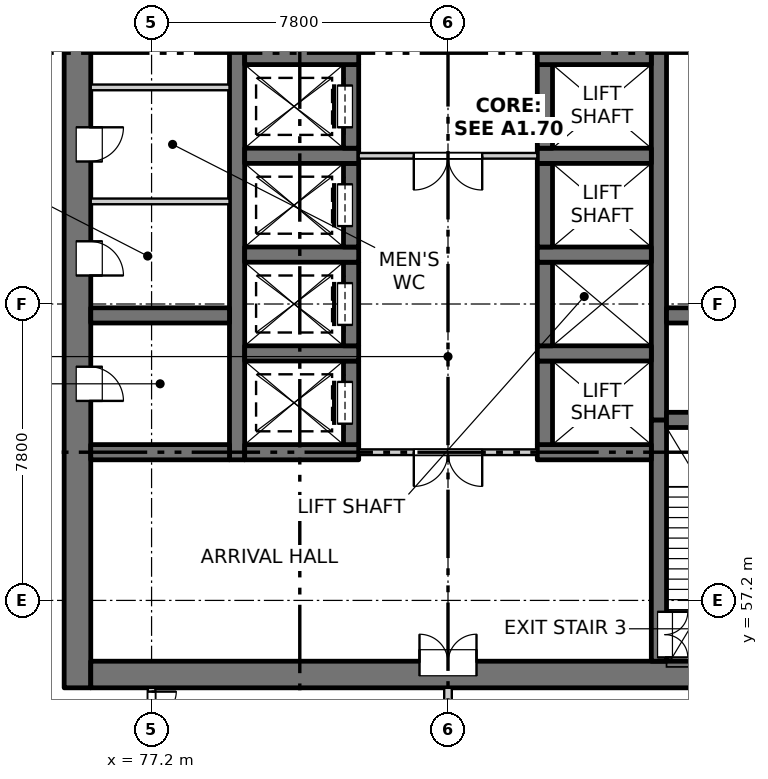
"""IFC4 building model, lengths in metres.
Left out: names, types, materials, properties, quantities, classifications, styles, units other than length and angle.
Written with IfcOpenShell. Run it as: python <this file> out.ifc"""

import sys

from ifc_helpers import new_model, si_unit, direction, frame, frame_2d, origin, place, context, subcontext, project, spatial, rectangle, extrude, element, fill, save


model = new_model("IFC4")
c1 = context("Model", 3, precision=1e-05, world=origin(), true_north=direction((0.0, 1.0)))
c2 = subcontext(c1, "Body", "Model", "MODEL_VIEW")
j1 = project(units=[si_unit("LENGTHUNIT", "METRE"), si_unit("PLANEANGLEUNIT", "RADIAN")], contexts=[c1])
p1 = place(None, origin())
s1 = spatial("IfcSite", under=j1, at=p1, CompositionType="ELEMENT")
p2 = place(p1, origin())
s2 = spatial("IfcBuilding", under=s1, at=p2, CompositionType="ELEMENT")
p3 = place(p2, frame((0.0, 0.0, 6.0)))
s3 = spatial("IfcBuildingStorey", under=s2, at=p3, CompositionType="ELEMENT", Elevation=6.0)
p4 = place(p3, frame((75.25, 54.9, -0.3), z_axis=(0.0, 0.0, 1.0), x_axis=(0.0, 1.0, 0.0)))
e1 = element("IfcWall", 1, at=p4, inside=s3, PredefinedType="SOLIDWALL", context=c2, shape_type="SweptSolid", body=[
    extrude(rectangle(XDim=22.4, YDim=0.7, at=frame_2d((11.2, 0.0))), origin(), (0.0, 0.0, 1.0), 4.5),
])
p5 = place(p4, frame((7.55, 0.0, 0.3)))
e2 = element("IfcOpeningElement", 2, at=p5, cuts=e1, PredefinedType="OPENING", context=c2, shape_type="SweptSolid", body=[
    extrude(rectangle(XDim=0.9, YDim=2.1, at=frame_2d((0.45, 1.05))), frame((0.0, 0.36, 0.0), z_axis=(0.0, -1.0, 0.0), x_axis=(1.0, 0.0, 0.0)), (0.0, 0.0, 1.0), 0.72),
])
p6 = place(p4, frame((10.85, 0.0, 0.3)))
e3 = element("IfcOpeningElement", 3, at=p6, cuts=e1, PredefinedType="OPENING", context=c2, shape_type="SweptSolid", body=[
    extrude(rectangle(XDim=0.9, YDim=2.1, at=frame_2d((0.45, 1.05))), frame((0.0, 0.36, 0.0), z_axis=(0.0, -1.0, 0.0), x_axis=(1.0, 0.0, 0.0)), (0.0, 0.0, 1.0), 0.72),
])
p7 = place(p4, frame((13.85, 0.0, 0.3)))
e4 = element("IfcOpeningElement", 4, at=p7, cuts=e1, PredefinedType="OPENING", context=c2, shape_type="SweptSolid", body=[
    extrude(rectangle(XDim=0.9, YDim=2.1, at=frame_2d((0.45, 1.05))), frame((0.0, 0.36, 0.0), z_axis=(0.0, -1.0, 0.0), x_axis=(1.0, 0.0, 0.0)), (0.0, 0.0, 1.0), 0.72),
])
p8 = place(p4, frame((16.85, 0.0, 0.3)))
e5 = element("IfcOpeningElement", 5, at=p8, cuts=e1, PredefinedType="OPENING", context=c2, shape_type="SweptSolid", body=[
    extrude(rectangle(XDim=0.9, YDim=2.1, at=frame_2d((0.45, 1.05))), frame((0.0, 0.36, 0.0), z_axis=(0.0, -1.0, 0.0), x_axis=(1.0, 0.0, 0.0)), (0.0, 0.0, 1.0), 0.72),
])
p9 = place(p4, frame((20.15, 0.0, 0.3)))
e6 = element("IfcOpeningElement", 6, at=p9, cuts=e1, PredefinedType="OPENING", context=c2, shape_type="SweptSolid", body=[
    extrude(rectangle(XDim=0.9, YDim=2.1, at=frame_2d((0.45, 1.05))), frame((0.0, 0.36, 0.0), z_axis=(0.0, -1.0, 0.0), x_axis=(1.0, 0.0, 0.0)), (0.0, 0.0, 1.0), 0.72),
])
p10 = place(p3, frame((75.6, 55.25, -0.3), z_axis=(0.0, 0.0, 1.0), x_axis=(1.0, 0.0, 0.0)))
e7 = element("IfcWall", 7, at=p10, inside=s3, PredefinedType="SOLIDWALL", context=c2, shape_type="SweptSolid", body=[
    extrude(rectangle(XDim=18.8, YDim=0.7, at=frame_2d((9.4, 0.0))), origin(), (0.0, 0.0, 1.0), 4.5),
])
p11 = place(p10, frame((8.65, 0.0, 0.3)))
e8 = element("IfcOpeningElement", 8, at=p11, cuts=e7, PredefinedType="OPENING", context=c2, shape_type="SweptSolid", body=[
    extrude(rectangle(XDim=1.5, YDim=2.1, at=frame_2d((0.75, 1.05))), frame((0.0, 0.36, 0.0), z_axis=(0.0, -1.0, 0.0), x_axis=(1.0, 0.0, 0.0)), (0.0, 0.0, 1.0), 0.72),
])
p12 = place(p3, frame((79.45, 60.9, -0.3), z_axis=(0.0, 0.0, 1.0), x_axis=(0.0, 1.0, 0.0)))
e9 = element("IfcWall", 9, at=p12, inside=s3, PredefinedType="SOLIDWALL", context=c2, shape_type="SweptSolid", body=[
    extrude(rectangle(XDim=16.4, YDim=0.4, at=frame_2d((8.2, 0.0))), origin(), (0.0, 0.0, 1.0), 4.5),
])
p13 = place(p3, frame((90.55, 55.6, -0.3), z_axis=(0.0, 0.0, 1.0), x_axis=(0.0, 1.0, 0.0)))
e10 = element("IfcWall", 10, at=p13, inside=s3, PredefinedType="SOLIDWALL", context=c2, shape_type="SweptSolid", body=[
    extrude(rectangle(XDim=6.35, YDim=0.4, at=frame_2d((3.175, 0.0))), origin(), (0.0, 0.0, 1.0), 4.5),
])
p14 = place(p13, frame((0.1, 0.0, 0.3)))
e11 = element("IfcOpeningElement", 11, at=p14, cuts=e10, PredefinedType="OPENING", context=c2, shape_type="SweptSolid", body=[
    extrude(rectangle(XDim=1.2, YDim=2.1, at=frame_2d((0.6, 1.05))), frame((0.0, 0.21, 0.0), z_axis=(0.0, -1.0, 0.0), x_axis=(1.0, 0.0, 0.0)), (0.0, 0.0, 1.0), 0.42),
])
p15 = place(p3, frame((90.55, 61.95, -0.3), z_axis=(0.0, 0.0, 1.0), x_axis=(0.0, 1.0, 0.0)))
e12 = element("IfcWall", 12, at=p15, inside=s3, PredefinedType="SOLIDWALL", context=c2, shape_type="SweptSolid", body=[
    extrude(rectangle(XDim=15.35, YDim=0.4, at=frame_2d((7.675, 0.0))), origin(), (0.0, 0.0, 1.0), 4.5),
])
p16 = place(p3, frame((79.65, 61.1, -0.3), z_axis=(0.0, 0.0, 1.0), x_axis=(1.0, 0.0, 0.0)))
e13 = element("IfcWall", 13, at=p16, inside=s3, PredefinedType="SOLIDWALL", context=c2, shape_type="SweptSolid", body=[
    extrude(rectangle(XDim=3.0, YDim=0.4, at=frame_2d((1.5, 0.0))), origin(), (0.0, 0.0, 1.0), 4.5),
])
p17 = place(p3, frame((82.45, 61.3, -0.3), z_axis=(0.0, 0.0, 1.0), x_axis=(0.0, 1.0, 0.0)))
e14 = element("IfcWall", 14, at=p17, inside=s3, PredefinedType="SOLIDWALL", context=c2, shape_type="SweptSolid", body=[
    extrude(rectangle(XDim=2.2, YDim=0.4, at=frame_2d((1.1, 0.0))), origin(), (0.0, 0.0, 1.0), 4.5),
])
p18 = place(p17, frame((0.55, 0.0, 0.3)))
e15 = element("IfcOpeningElement", 15, at=p18, cuts=e14, PredefinedType="OPENING", context=c2, shape_type="SweptSolid", body=[
    extrude(rectangle(XDim=1.1, YDim=2.1, at=frame_2d((0.55, 1.05))), frame((0.0, 0.21, 0.0), z_axis=(0.0, -1.0, 0.0), x_axis=(1.0, 0.0, 0.0)), (0.0, 0.0, 1.0), 0.42),
])
p19 = place(p3, frame((79.65, 63.7, -0.3), z_axis=(0.0, 0.0, 1.0), x_axis=(1.0, 0.0, 0.0)))
e16 = element("IfcWall", 16, at=p19, inside=s3, PredefinedType="SOLIDWALL", context=c2, shape_type="SweptSolid", body=[
    extrude(rectangle(XDim=3.0, YDim=0.4, at=frame_2d((1.5, 0.0))), origin(), (0.0, 0.0, 1.0), 4.5),
])
p20 = place(p3, frame((82.45, 63.9, -0.3), z_axis=(0.0, 0.0, 1.0), x_axis=(0.0, 1.0, 0.0)))
e17 = element("IfcWall", 17, at=p20, inside=s3, PredefinedType="SOLIDWALL", context=c2, shape_type="SweptSolid", body=[
    extrude(rectangle(XDim=2.2, YDim=0.4, at=frame_2d((1.1, 0.0))), origin(), (0.0, 0.0, 1.0), 4.5),
])
p21 = place(p20, frame((0.55, 0.0, 0.3)))
e18 = element("IfcOpeningElement", 18, at=p21, cuts=e17, PredefinedType="OPENING", context=c2, shape_type="SweptSolid", body=[
    extrude(rectangle(XDim=1.1, YDim=2.1, at=frame_2d((0.55, 1.05))), frame((0.0, 0.21, 0.0), z_axis=(0.0, -1.0, 0.0), x_axis=(1.0, 0.0, 0.0)), (0.0, 0.0, 1.0), 0.42),
])
p22 = place(p3, frame((79.65, 66.3, -0.3), z_axis=(0.0, 0.0, 1.0), x_axis=(1.0, 0.0, 0.0)))
e19 = element("IfcWall", 19, at=p22, inside=s3, PredefinedType="SOLIDWALL", context=c2, shape_type="SweptSolid", body=[
    extrude(rectangle(XDim=3.0, YDim=0.4, at=frame_2d((1.5, 0.0))), origin(), (0.0, 0.0, 1.0), 4.5),
])
p23 = place(p3, frame((82.45, 66.5, -0.3), z_axis=(0.0, 0.0, 1.0), x_axis=(0.0, 1.0, 0.0)))
e20 = element("IfcWall", 20, at=p23, inside=s3, PredefinedType="SOLIDWALL", context=c2, shape_type="SweptSolid", body=[
    extrude(rectangle(XDim=2.2, YDim=0.4, at=frame_2d((1.1, 0.0))), origin(), (0.0, 0.0, 1.0), 4.5),
])
p24 = place(p23, frame((0.55, 0.0, 0.3)))
e21 = element("IfcOpeningElement", 21, at=p24, cuts=e20, PredefinedType="OPENING", context=c2, shape_type="SweptSolid", body=[
    extrude(rectangle(XDim=1.1, YDim=2.1, at=frame_2d((0.55, 1.05))), frame((0.0, 0.21, 0.0), z_axis=(0.0, -1.0, 0.0), x_axis=(1.0, 0.0, 0.0)), (0.0, 0.0, 1.0), 0.42),
])
p25 = place(p3, frame((79.65, 68.9, -0.3), z_axis=(0.0, 0.0, 1.0), x_axis=(1.0, 0.0, 0.0)))
e22 = element("IfcWall", 22, at=p25, inside=s3, PredefinedType="SOLIDWALL", context=c2, shape_type="SweptSolid", body=[
    extrude(rectangle(XDim=3.0, YDim=0.4, at=frame_2d((1.5, 0.0))), origin(), (0.0, 0.0, 1.0), 4.5),
])
p26 = place(p3, frame((82.45, 69.1, -0.3), z_axis=(0.0, 0.0, 1.0), x_axis=(0.0, 1.0, 0.0)))
e23 = element("IfcWall", 23, at=p26, inside=s3, PredefinedType="SOLIDWALL", context=c2, shape_type="SweptSolid", body=[
    extrude(rectangle(XDim=2.2, YDim=0.4, at=frame_2d((1.1, 0.0))), origin(), (0.0, 0.0, 1.0), 4.5),
])
p27 = place(p26, frame((0.55, 0.0, 0.3)))
e24 = element("IfcOpeningElement", 24, at=p27, cuts=e23, PredefinedType="OPENING", context=c2, shape_type="SweptSolid", body=[
    extrude(rectangle(XDim=1.1, YDim=2.1, at=frame_2d((0.55, 1.05))), frame((0.0, 0.21, 0.0), z_axis=(0.0, -1.0, 0.0), x_axis=(1.0, 0.0, 0.0)), (0.0, 0.0, 1.0), 0.42),
])
for number, where, z_axis, x_axis in (
    (25, (79.65, 71.5, -0.3), (0.0, 0.0, 1.0), (1.0, 0.0, 0.0)),
    (26, (87.35, 61.1, -0.3), (0.0, 0.0, 1.0), (1.0, 0.0, 0.0)),
):
    element("IfcWall", number, at=place(p3, frame(where, z_axis=z_axis, x_axis=x_axis)), inside=s3, PredefinedType="SOLIDWALL", context=c2, shape_type="SweptSolid", body=[
        extrude(rectangle(XDim=3.0, YDim=0.4, at=frame_2d((1.5, 0.0))), origin(), (0.0, 0.0, 1.0), 4.5),
    ])
p28 = place(p3, frame((87.55, 61.3, -0.3), z_axis=(0.0, 0.0, 1.0), x_axis=(0.0, 1.0, 0.0)))
e27 = element("IfcWall", 27, at=p28, inside=s3, PredefinedType="SOLIDWALL", context=c2, shape_type="SweptSolid", body=[
    extrude(rectangle(XDim=2.2, YDim=0.4, at=frame_2d((1.1, 0.0))), origin(), (0.0, 0.0, 1.0), 4.5),
])
p29 = place(p3, frame((87.35, 63.7, -0.3), z_axis=(0.0, 0.0, 1.0), x_axis=(1.0, 0.0, 0.0)))
e28 = element("IfcWall", 28, at=p29, inside=s3, PredefinedType="SOLIDWALL", context=c2, shape_type="SweptSolid", body=[
    extrude(rectangle(XDim=3.0, YDim=0.4, at=frame_2d((1.5, 0.0))), origin(), (0.0, 0.0, 1.0), 4.5),
])
p30 = place(p3, frame((87.55, 63.9, -0.3), z_axis=(0.0, 0.0, 1.0), x_axis=(0.0, 1.0, 0.0)))
e29 = element("IfcWall", 29, at=p30, inside=s3, PredefinedType="SOLIDWALL", context=c2, shape_type="SweptSolid", body=[
    extrude(rectangle(XDim=2.2, YDim=0.4, at=frame_2d((1.1, 0.0))), origin(), (0.0, 0.0, 1.0), 4.5),
])
p31 = place(p3, frame((87.35, 66.3, -0.3), z_axis=(0.0, 0.0, 1.0), x_axis=(1.0, 0.0, 0.0)))
e30 = element("IfcWall", 30, at=p31, inside=s3, PredefinedType="SOLIDWALL", context=c2, shape_type="SweptSolid", body=[
    extrude(rectangle(XDim=3.0, YDim=0.4, at=frame_2d((1.5, 0.0))), origin(), (0.0, 0.0, 1.0), 4.5),
])
p32 = place(p3, frame((87.55, 66.5, -0.3), z_axis=(0.0, 0.0, 1.0), x_axis=(0.0, 1.0, 0.0)))
e31 = element("IfcWall", 31, at=p32, inside=s3, PredefinedType="SOLIDWALL", context=c2, shape_type="SweptSolid", body=[
    extrude(rectangle(XDim=2.2, YDim=0.4, at=frame_2d((1.1, 0.0))), origin(), (0.0, 0.0, 1.0), 4.5),
])
p33 = place(p3, frame((87.35, 68.9, -0.3), z_axis=(0.0, 0.0, 1.0), x_axis=(1.0, 0.0, 0.0)))
e32 = element("IfcWall", 32, at=p33, inside=s3, PredefinedType="SOLIDWALL", context=c2, shape_type="SweptSolid", body=[
    extrude(rectangle(XDim=3.0, YDim=0.4, at=frame_2d((1.5, 0.0))), origin(), (0.0, 0.0, 1.0), 4.5),
])
p34 = place(p3, frame((87.55, 69.1, -0.3), z_axis=(0.0, 0.0, 1.0), x_axis=(0.0, 1.0, 0.0)))
e33 = element("IfcWall", 33, at=p34, inside=s3, PredefinedType="SOLIDWALL", context=c2, shape_type="SweptSolid", body=[
    extrude(rectangle(XDim=2.2, YDim=0.4, at=frame_2d((1.1, 0.0))), origin(), (0.0, 0.0, 1.0), 4.5),
])
p35 = place(p3, frame((87.35, 71.5, -0.3), z_axis=(0.0, 0.0, 1.0), x_axis=(1.0, 0.0, 0.0)))
e34 = element("IfcWall", 34, at=p35, inside=s3, PredefinedType="SOLIDWALL", context=c2, shape_type="SweptSolid", body=[
    extrude(rectangle(XDim=3.0, YDim=0.4, at=frame_2d((1.5, 0.0))), origin(), (0.0, 0.0, 1.0), 4.5),
])
for number, where, z_axis, x_axis in (
    (35, (75.6, 61.1, -0.3), (0.0, 0.0, 1.0), (1.0, 0.0, 0.0)),
    (36, (75.6, 64.7, -0.3), (0.0, 0.0, 1.0), (1.0, 0.0, 0.0)),
    (37, (90.75, 61.95, -0.3), (0.0, 0.0, 1.0), (1.0, 0.0, 0.0)),
    (38, (90.75, 64.7, -0.3), (0.0, 0.0, 1.0), (1.0, 0.0, 0.0)),
):
    element("IfcWall", number, at=place(p3, frame(where, z_axis=z_axis, x_axis=x_axis)), inside=s3, PredefinedType="SOLIDWALL", context=c2, shape_type="SweptSolid", body=[
        extrude(rectangle(XDim=3.65, YDim=0.4, at=frame_2d((1.825, 0.0))), origin(), (0.0, 0.0, 1.0), 4.5),
    ])
p36 = place(p3, frame((82.65, 61.1, 0.0), z_axis=(0.0, 0.0, 1.0), x_axis=(1.0, 0.0, 0.0)))
e39 = element("IfcWall", 39, at=p36, inside=s3, PredefinedType="PARTITIONING", context=c2, shape_type="SweptSolid", body=[
    extrude(rectangle(XDim=4.7, YDim=0.15, at=frame_2d((2.35, 0.0))), origin(), (0.0, 0.0, 1.0), 4.2),
])
p37 = place(p36, frame((1.45, 0.0, 0.0)))
e40 = element("IfcOpeningElement", 40, at=p37, cuts=e39, PredefinedType="OPENING", context=c2, shape_type="SweptSolid", body=[
    extrude(rectangle(XDim=1.8, YDim=2.1, at=frame_2d((0.9, 1.05))), frame((0.0, 0.085, 0.0), z_axis=(0.0, -1.0, 0.0), x_axis=(1.0, 0.0, 0.0)), (0.0, 0.0, 1.0), 0.17),
])
p38 = place(p3, frame((75.6, 67.7, 0.0), z_axis=(0.0, 0.0, 1.0), x_axis=(1.0, 0.0, 0.0)))
e41 = element("IfcWall", 41, at=p38, inside=s3, PredefinedType="PARTITIONING", context=c2, shape_type="SweptSolid", body=[
    extrude(rectangle(XDim=3.65, YDim=0.15, at=frame_2d((1.825, 0.0))), origin(), (0.0, 0.0, 1.0), 4.2),
])
p39 = place(p3, frame((82.65, 68.9, 0.0), z_axis=(0.0, 0.0, 1.0), x_axis=(1.0, 0.0, 0.0)))
e42 = element("IfcWall", 42, at=p39, inside=s3, PredefinedType="PARTITIONING", context=c2, shape_type="SweptSolid", body=[
    extrude(rectangle(XDim=4.7, YDim=0.15, at=frame_2d((2.35, 0.0))), origin(), (0.0, 0.0, 1.0), 4.2),
])
p40 = place(p39, frame((1.45, 0.0, 0.0)))
e43 = element("IfcOpeningElement", 43, at=p40, cuts=e42, PredefinedType="OPENING", context=c2, shape_type="SweptSolid", body=[
    extrude(rectangle(XDim=1.8, YDim=2.1, at=frame_2d((0.9, 1.05))), frame((0.0, 0.085, 0.0), z_axis=(0.0, -1.0, 0.0), x_axis=(1.0, 0.0, 0.0)), (0.0, 0.0, 1.0), 0.17),
])
p41 = place(p3, frame((75.6, 70.7, 0.0), z_axis=(0.0, 0.0, 1.0), x_axis=(1.0, 0.0, 0.0)))
e44 = element("IfcWall", 44, at=p41, inside=s3, PredefinedType="PARTITIONING", context=c2, shape_type="SweptSolid", body=[
    extrude(rectangle(XDim=3.65, YDim=0.15, at=frame_2d((1.825, 0.0))), origin(), (0.0, 0.0, 1.0), 4.2),
])
p42 = place(p3, frame((77.2, 53.4, 0.0), z_axis=(0.0, 0.0, 1.0), x_axis=(0.0, 1.0, 0.0)))
e45 = element("IfcWall", 45, at=p42, inside=s3, PredefinedType="PARTITIONING", context=c2, shape_type="SweptSolid", body=[
    extrude(rectangle(XDim=1.5, YDim=0.2, at=frame_2d((0.75, 0.0))), origin(), (0.0, 0.0, 1.0), 4.2),
])
p43 = place(p42, frame((0.1, 0.0, 0.0)))
e46 = element("IfcOpeningElement", 46, at=p43, cuts=e45, PredefinedType="OPENING", context=c2, shape_type="SweptSolid", body=[
    extrude(rectangle(XDim=1.3, YDim=2.1, at=frame_2d((0.65, 1.05))), frame((0.0, 0.11, 0.0), z_axis=(0.0, -1.0, 0.0), x_axis=(1.0, 0.0, 0.0)), (0.0, 0.0, 1.0), 0.22),
])
p44 = place(p3, frame((85.0, 29.98, 0.0), z_axis=(0.0, 0.0, 1.0), x_axis=(0.0, 1.0, 0.0)))
e47 = element("IfcWall", 47, at=p44, inside=s3, PredefinedType="PARTITIONING", context=c2, shape_type="SweptSolid", body=[
    extrude(rectangle(XDim=24.92, YDim=0.2, at=frame_2d((12.46, 0.0))), origin(), (0.0, 0.0, 1.0), 4.2),
])
p45 = place(p44, frame((6.97, 0.0, 0.0)))
e48 = element("IfcOpeningElement", 48, at=p45, cuts=e47, PredefinedType="OPENING", context=c2, shape_type="SweptSolid", body=[
    extrude(rectangle(XDim=1.5, YDim=2.1, at=frame_2d((0.75, 1.05))), frame((0.0, 0.11, 0.0), z_axis=(0.0, -1.0, 0.0), x_axis=(1.0, 0.0, 0.0)), (0.0, 0.0, 1.0), 0.22),
])
p46 = place(p44, frame((14.77, 0.0, 0.0)))
e49 = element("IfcOpeningElement", 49, at=p46, cuts=e47, PredefinedType="OPENING", context=c2, shape_type="SweptSolid", body=[
    extrude(rectangle(XDim=1.5, YDim=2.1, at=frame_2d((0.75, 1.05))), frame((0.0, 0.11, 0.0), z_axis=(0.0, -1.0, 0.0), x_axis=(1.0, 0.0, 0.0)), (0.0, 0.0, 1.0), 0.22),
])
p47 = place(p43, origin())
e50 = element("IfcDoor", 50, at=p47, inside=s3, OperationType="DOUBLE_DOOR_SINGLE_SWING", PredefinedType="DOOR", context=c2, shape_type="SweptSolid", body=[
    extrude(rectangle(XDim=1.3, YDim=2.1, at=frame_2d((0.65, 1.05))), frame((0.0, 0.025, 0.0), z_axis=(0.0, -1.0, 0.0), x_axis=(1.0, 0.0, 0.0)), (0.0, 0.0, 1.0), 0.05),
])
fill(e46, e50)
p48 = place(p11, origin())
e51 = element("IfcDoor", 51, at=p48, inside=s3, OperationType="DOUBLE_DOOR_SINGLE_SWING", PredefinedType="DOOR", context=c2, shape_type="SweptSolid", body=[
    extrude(rectangle(XDim=1.5, YDim=2.1, at=frame_2d((0.75, 1.05))), frame((0.0, 0.335, 0.0), z_axis=(0.0, -1.0, 0.0), x_axis=(1.0, 0.0, 0.0)), (0.0, 0.0, 1.0), 0.05),
])
fill(e8, e51)
p49 = place(p14, origin())
e52 = element("IfcDoor", 52, at=p49, inside=s3, OperationType="DOUBLE_DOOR_SINGLE_SWING", PredefinedType="DOOR", context=c2, shape_type="SweptSolid", body=[
    extrude(rectangle(XDim=1.2, YDim=2.1, at=frame_2d((0.6, 1.05))), frame((0.0, -0.135, 0.0), z_axis=(0.0, -1.0, 0.0), x_axis=(1.0, 0.0, 0.0)), (0.0, 0.0, 1.0), 0.05),
])
fill(e11, e52)
p50 = place(p37, origin())
e53 = element("IfcDoor", 53, at=p50, inside=s3, OperationType="DOUBLE_DOOR_SINGLE_SWING", PredefinedType="DOOR", context=c2, shape_type="SweptSolid", body=[
    extrude(rectangle(XDim=1.8, YDim=2.1, at=frame_2d((0.9, 1.05))), frame((0.0, 0.025, 0.0), z_axis=(0.0, -1.0, 0.0), x_axis=(1.0, 0.0, 0.0)), (0.0, 0.0, 1.0), 0.05),
])
fill(e40, e53)
p51 = place(p18, origin())
e54 = element("IfcDoor", 54, at=p51, inside=s3, OperationType="SLIDING_TO_RIGHT", PredefinedType="DOOR", context=c2, shape_type="SweptSolid", body=[
    extrude(rectangle(XDim=1.1, YDim=2.1, at=frame_2d((0.55, 1.05))), frame((0.0, 0.185, 0.0), z_axis=(0.0, -1.0, 0.0), x_axis=(1.0, 0.0, 0.0)), (0.0, 0.0, 1.0), 0.05),
])
fill(e15, e54)
p52 = place(p5, origin())
e55 = element("IfcDoor", 55, at=p52, inside=s3, OperationType="SINGLE_SWING_RIGHT", PredefinedType="DOOR", context=c2, shape_type="SweptSolid", body=[
    extrude(rectangle(XDim=0.9, YDim=2.1, at=frame_2d((0.45, 1.05))), frame((0.0, -0.285, 0.0), z_axis=(0.0, -1.0, 0.0), x_axis=(1.0, 0.0, 0.0)), (0.0, 0.0, 1.0), 0.05),
])
fill(e2, e55)
p53 = place(p21, origin())
e56 = element("IfcDoor", 56, at=p53, inside=s3, OperationType="SLIDING_TO_RIGHT", PredefinedType="DOOR", context=c2, shape_type="SweptSolid", body=[
    extrude(rectangle(XDim=1.1, YDim=2.1, at=frame_2d((0.55, 1.05))), frame((0.0, 0.185, 0.0), z_axis=(0.0, -1.0, 0.0), x_axis=(1.0, 0.0, 0.0)), (0.0, 0.0, 1.0), 0.05),
])
fill(e18, e56)
p54 = place(p6, origin())
e57 = element("IfcDoor", 57, at=p54, inside=s3, OperationType="SINGLE_SWING_RIGHT", PredefinedType="DOOR", context=c2, shape_type="SweptSolid", body=[
    extrude(rectangle(XDim=0.9, YDim=2.1, at=frame_2d((0.45, 1.05))), frame((0.0, -0.285, 0.0), z_axis=(0.0, -1.0, 0.0), x_axis=(1.0, 0.0, 0.0)), (0.0, 0.0, 1.0), 0.05),
])
fill(e3, e57)
p55 = place(p24, origin())
e58 = element("IfcDoor", 58, at=p55, inside=s3, OperationType="SLIDING_TO_RIGHT", PredefinedType="DOOR", context=c2, shape_type="SweptSolid", body=[
    extrude(rectangle(XDim=1.1, YDim=2.1, at=frame_2d((0.55, 1.05))), frame((0.0, 0.185, 0.0), z_axis=(0.0, -1.0, 0.0), x_axis=(1.0, 0.0, 0.0)), (0.0, 0.0, 1.0), 0.05),
])
fill(e21, e58)
p56 = place(p40, origin())
e59 = element("IfcDoor", 59, at=p56, inside=s3, OperationType="DOUBLE_DOOR_SINGLE_SWING", PredefinedType="DOOR", context=c2, shape_type="SweptSolid", body=[
    extrude(rectangle(XDim=1.8, YDim=2.1, at=frame_2d((0.9, 1.05))), frame((0.0, 0.025, 0.0), z_axis=(0.0, -1.0, 0.0), x_axis=(1.0, 0.0, 0.0)), (0.0, 0.0, 1.0), 0.05),
])
fill(e43, e59)
p57 = place(p7, origin())
e60 = element("IfcDoor", 60, at=p57, inside=s3, OperationType="SINGLE_SWING_LEFT", PredefinedType="DOOR", context=c2, shape_type="SweptSolid", body=[
    extrude(rectangle(XDim=0.9, YDim=2.1, at=frame_2d((0.45, 1.05))), frame((0.0, -0.285, 0.0), z_axis=(0.0, -1.0, 0.0), x_axis=(1.0, 0.0, 0.0)), (0.0, 0.0, 1.0), 0.05),
])
fill(e4, e60)
p58 = place(p27, origin())
e61 = element("IfcDoor", 61, at=p58, inside=s3, OperationType="SLIDING_TO_LEFT", PredefinedType="DOOR", context=c2, shape_type="SweptSolid", body=[
    extrude(rectangle(XDim=1.1, YDim=2.1, at=frame_2d((0.55, 1.05))), frame((0.0, 0.185, 0.0), z_axis=(0.0, -1.0, 0.0), x_axis=(1.0, 0.0, 0.0)), (0.0, 0.0, 1.0), 0.05),
])
fill(e24, e61)
save(model, sys.argv[1])
